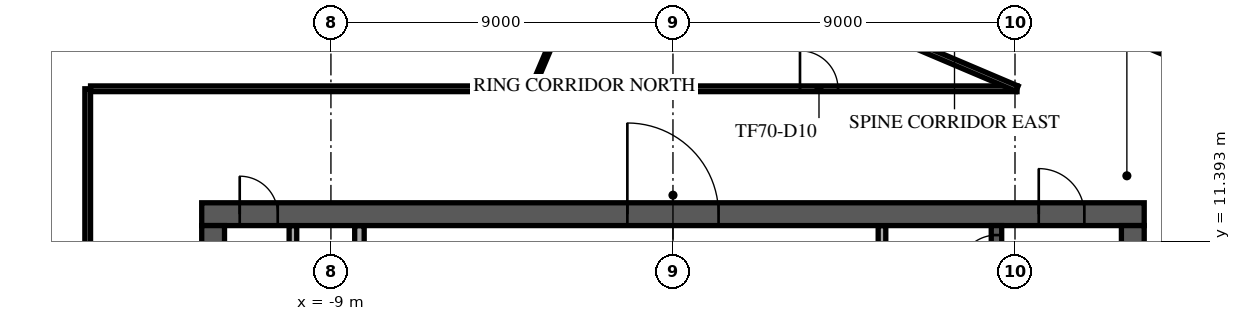
"""IFC4 building model, lengths in metres.
Left out: names, types, materials, properties, quantities, classifications, styles, units other than length and angle.
Written with IfcOpenShell. Run it as: python <this file> out.ifc"""

import sys

from ifc_helpers import new_model, si_unit, direction, frame, frame_2d, origin, place, context, subcontext, project, spatial, rectangle, extrude, element, fill, save


model = new_model("IFC4")
c1 = context("Model", 3, precision=1e-05, world=origin(), true_north=direction((0.0, 1.0)))
c2 = subcontext(c1, "Body", "Model", "MODEL_VIEW")
j1 = project(units=[si_unit("LENGTHUNIT", "METRE"), si_unit("PLANEANGLEUNIT", "RADIAN")], contexts=[c1])
p1 = place(None, origin())
s1 = spatial("IfcSite", under=j1, at=p1, CompositionType="ELEMENT")
p2 = place(p1, origin())
s2 = spatial("IfcBuilding", under=s1, at=p2, CompositionType="ELEMENT")
p3 = place(p2, frame((0.0, 0.0, 296.5)))
s3 = spatial("IfcBuildingStorey", under=s2, at=p3, CompositionType="ELEMENT", Elevation=296.5)
p4 = place(p3, frame((-12.4, 12.1, 0.0), z_axis=(0.0, 0.0, 1.0), x_axis=(1.0, 0.0, 0.0)))
e1 = element("IfcWall", 1, at=p4, inside=s3, PredefinedType="SHEAR", context=c2, shape_type="SweptSolid", body=[
    extrude(rectangle(XDim=24.8, YDim=0.6, at=frame_2d((12.4, 0.0))), origin(), (0.0, 0.0, 1.0), 3.65),
])
p5 = place(p4, frame((11.2, 0.0, 0.0)))
e2 = element("IfcOpeningElement", 2, at=p5, cuts=e1, PredefinedType="OPENING", context=c2, shape_type="SweptSolid", body=[
    extrude(rectangle(XDim=2.4, YDim=2.4, at=frame_2d((1.2, 1.2))), frame((0.0, 0.31, 0.0), z_axis=(0.0, -1.0, 0.0), x_axis=(1.0, 0.0, 0.0)), (0.0, 0.0, 1.0), 0.62),
])
p6 = place(p4, frame((22.025, 0.0, 0.0)))
e3 = element("IfcOpeningElement", 3, at=p6, cuts=e1, PredefinedType="OPENING", context=c2, shape_type="SweptSolid", body=[
    extrude(rectangle(XDim=1.2, YDim=2.1, at=frame_2d((0.6, 1.05))), frame((0.0, 0.31, 0.0), z_axis=(0.0, -1.0, 0.0), x_axis=(1.0, 0.0, 0.0)), (0.0, 0.0, 1.0), 0.62),
])
p7 = place(p4, frame((1.0, 0.0, 0.0)))
e4 = element("IfcOpeningElement", 4, at=p7, cuts=e1, PredefinedType="OPENING", context=c2, shape_type="SweptSolid", body=[
    extrude(rectangle(XDim=1.0, YDim=2.1, at=frame_2d((0.5, 1.05))), frame((0.0, 0.31, 0.0), z_axis=(0.0, -1.0, 0.0), x_axis=(1.0, 0.0, 0.0)), (0.0, 0.0, 1.0), 0.62),
])
p8 = place(p3, frame((12.1, -11.8, 0.0), z_axis=(0.0, 0.0, 1.0), x_axis=(0.0, 1.0, 0.0)))
e5 = element("IfcWall", 5, at=p8, inside=s3, PredefinedType="SHEAR", context=c2, shape_type="SweptSolid", body=[
    extrude(rectangle(XDim=23.6, YDim=0.6, at=frame_2d((11.8, 0.0))), origin(), (0.0, 0.0, 1.0), 3.65),
])
p9 = place(p8, frame((10.6, 0.0, 0.0)))
e6 = element("IfcOpeningElement", 6, at=p9, cuts=e5, PredefinedType="OPENING", context=c2, shape_type="SweptSolid", body=[
    extrude(rectangle(XDim=2.4, YDim=2.4, at=frame_2d((1.2, 1.2))), frame((0.0, 0.31, 0.0), z_axis=(0.0, -1.0, 0.0), x_axis=(1.0, 0.0, 0.0)), (0.0, 0.0, 1.0), 0.62),
])
p10 = place(p3, frame((-12.1, -11.8, 0.0), z_axis=(0.0, 0.0, 1.0), x_axis=(0.0, 1.0, 0.0)))
e7 = element("IfcWall", 7, at=p10, inside=s3, PredefinedType="SHEAR", context=c2, shape_type="SweptSolid", body=[
    extrude(rectangle(XDim=23.6, YDim=0.6, at=frame_2d((11.8, 0.0))), origin(), (0.0, 0.0, 1.0), 3.65),
])
p11 = place(p10, frame((10.6, 0.0, 0.0)))
e8 = element("IfcOpeningElement", 8, at=p11, cuts=e7, PredefinedType="OPENING", context=c2, shape_type="SweptSolid", body=[
    extrude(rectangle(XDim=2.4, YDim=2.4, at=frame_2d((1.2, 1.2))), frame((0.0, 0.31, 0.0), z_axis=(0.0, -1.0, 0.0), x_axis=(1.0, 0.0, 0.0)), (0.0, 0.0, 1.0), 0.62),
])
p12 = place(p3, frame((8.512, 4.55, 0.0), z_axis=(0.0, 0.0, 1.0), x_axis=(0.0, 1.0, 0.0)))
e9 = element("IfcWall", 9, at=p12, inside=s3, PredefinedType="SOLIDWALL", context=c2, shape_type="SweptSolid", body=[
    extrude(rectangle(XDim=7.25, YDim=0.275, at=frame_2d((3.625, 0.0))), origin(), (0.0, 0.0, 1.0), 3.65),
])
p13 = place(p12, frame((6.0, 0.0, 0.0)))
e10 = element("IfcOpeningElement", 10, at=p13, cuts=e9, PredefinedType="OPENING", context=c2, shape_type="SweptSolid", body=[
    extrude(rectangle(XDim=1.0, YDim=2.1, at=frame_2d((0.5, 1.05))), frame((0.0, 0.147, 0.0), z_axis=(0.0, -1.0, 0.0), x_axis=(1.0, 0.0, 0.0)), (0.0, 0.0, 1.0), 0.295),
])
p14 = place(p3, frame((-10.0, 4.78, 0.0), z_axis=(0.0, 0.0, 1.0), x_axis=(0.0, 1.0, 0.0)))
e11 = element("IfcWall", 11, at=p14, inside=s3, PredefinedType="PARTITIONING", context=c2, shape_type="SweptSolid", body=[
    extrude(rectangle(XDim=7.015, YDim=0.2, at=frame_2d((3.507, 0.0))), origin(), (0.0, 0.0, 1.0), 3.65),
])
p15 = place(p14, frame((2.92, 0.0, 0.0)))
e12 = element("IfcOpeningElement", 12, at=p15, cuts=e11, PredefinedType="OPENING", context=c2, shape_type="SweptSolid", body=[
    extrude(rectangle(XDim=1.0, YDim=2.1, at=frame_2d((0.5, 1.05))), frame((0.0, 0.11, 0.0), z_axis=(0.0, -1.0, 0.0), x_axis=(1.0, 0.0, 0.0)), (0.0, 0.0, 1.0), 0.22),
])
p16 = place(p3, frame((-8.25, 8.805, 0.0), z_axis=(0.0, 0.0, 1.0), x_axis=(0.0, 1.0, 0.0)))
e13 = element("IfcWall", 13, at=p16, inside=s3, PredefinedType="PARTITIONING", context=c2, shape_type="SweptSolid", body=[
    extrude(rectangle(XDim=2.99, YDim=0.25, at=frame_2d((1.495, 0.0))), origin(), (0.0, 0.0, 1.0), 3.65),
])
p17 = place(p16, frame((0.895, 0.0, 0.0)))
e14 = element("IfcOpeningElement", 14, at=p17, cuts=e13, PredefinedType="OPENING", context=c2, shape_type="SweptSolid", body=[
    extrude(rectangle(XDim=1.0, YDim=2.1, at=frame_2d((0.5, 1.05))), frame((0.0, 0.135, 0.0), z_axis=(0.0, -1.0, 0.0), x_axis=(1.0, 0.0, 0.0)), (0.0, 0.0, 1.0), 0.27),
])
p18 = place(p3, frame((5.5, 8.805, 0.0), z_axis=(0.0, 0.0, 1.0), x_axis=(0.0, 1.0, 0.0)))
e15 = element("IfcWall", 15, at=p18, inside=s3, PredefinedType="PARTITIONING", context=c2, shape_type="SweptSolid", body=[
    extrude(rectangle(XDim=2.99, YDim=0.2, at=frame_2d((1.495, 0.0))), origin(), (0.0, 0.0, 1.0), 3.65),
])
p19 = place(p18, frame((0.532, 0.0, 0.0)))
e16 = element("IfcOpeningElement", 16, at=p19, cuts=e15, PredefinedType="OPENING", context=c2, shape_type="SweptSolid", body=[
    extrude(rectangle(XDim=1.8, YDim=2.1, at=frame_2d((0.9, 1.05))), frame((0.0, 0.11, 0.0), z_axis=(0.0, -1.0, 0.0), x_axis=(1.0, 0.0, 0.0)), (0.0, 0.0, 1.0), 0.22),
])
p20 = place(p3, frame((-15.005, 32.985, 0.0), z_axis=(0.0, 0.0, 1.0), x_axis=(-0.39073034436, -0.920505186295, 0.0)))
e17 = element("IfcWall", 17, at=p20, inside=s3, PredefinedType="STANDARD", context=c2, shape_type="SweptSolid", body=[
    extrude(rectangle(XDim=48.49, YDim=0.6, at=frame_2d((24.245, 0.0))), origin(), (0.0, 0.0, 1.0), 3.65),
])
p21 = place(p20, frame((1.204, 0.0, 0.9)))
e18 = element("IfcOpeningElement", 18, at=p21, cuts=e17, PredefinedType="OPENING", context=c2, shape_type="SweptSolid", body=[
    extrude(rectangle(XDim=2.0, YDim=2.1, at=frame_2d((1.0, 1.05))), frame((0.0, 0.31, 0.0), z_axis=(0.0, -1.0, 0.0), x_axis=(1.0, 0.0, 0.0)), (0.0, 0.0, 1.0), 0.62),
])
p22 = place(p20, frame((5.612, 0.0, 0.9)))
e19 = element("IfcOpeningElement", 19, at=p22, cuts=e17, PredefinedType="OPENING", context=c2, shape_type="SweptSolid", body=[
    extrude(rectangle(XDim=2.0, YDim=2.1, at=frame_2d((1.0, 1.05))), frame((0.0, 0.31, 0.0), z_axis=(0.0, -1.0, 0.0), x_axis=(1.0, 0.0, 0.0)), (0.0, 0.0, 1.0), 0.62),
])
p23 = place(p20, frame((10.021, 0.0, 0.9)))
e20 = element("IfcOpeningElement", 20, at=p23, cuts=e17, PredefinedType="OPENING", context=c2, shape_type="SweptSolid", body=[
    extrude(rectangle(XDim=2.0, YDim=2.1, at=frame_2d((1.0, 1.05))), frame((0.0, 0.31, 0.0), z_axis=(0.0, -1.0, 0.0), x_axis=(1.0, 0.0, 0.0)), (0.0, 0.0, 1.0), 0.62),
])
p24 = place(p20, frame((14.428, 0.0, 0.9)))
e21 = element("IfcOpeningElement", 21, at=p24, cuts=e17, PredefinedType="OPENING", context=c2, shape_type="SweptSolid", body=[
    extrude(rectangle(XDim=2.0, YDim=2.1, at=frame_2d((1.0, 1.05))), frame((0.0, 0.31, 0.0), z_axis=(0.0, -1.0, 0.0), x_axis=(1.0, 0.0, 0.0)), (0.0, 0.0, 1.0), 0.62),
])
p25 = place(p20, frame((18.837, 0.0, 0.9)))
e22 = element("IfcOpeningElement", 22, at=p25, cuts=e17, PredefinedType="OPENING", context=c2, shape_type="SweptSolid", body=[
    extrude(rectangle(XDim=2.0, YDim=2.1, at=frame_2d((1.0, 1.05))), frame((0.0, 0.31, 0.0), z_axis=(0.0, -1.0, 0.0), x_axis=(1.0, 0.0, 0.0)), (0.0, 0.0, 1.0), 0.62),
])
p26 = place(p20, frame((23.245, 0.0, 0.9)))
e23 = element("IfcOpeningElement", 23, at=p26, cuts=e17, PredefinedType="OPENING", context=c2, shape_type="SweptSolid", body=[
    extrude(rectangle(XDim=2.0, YDim=2.1, at=frame_2d((1.0, 1.05))), frame((0.0, 0.31, 0.0), z_axis=(0.0, -1.0, 0.0), x_axis=(1.0, 0.0, 0.0)), (0.0, 0.0, 1.0), 0.62),
])
p27 = place(p20, frame((27.653, 0.0, 0.9)))
e24 = element("IfcOpeningElement", 24, at=p27, cuts=e17, PredefinedType="OPENING", context=c2, shape_type="SweptSolid", body=[
    extrude(rectangle(XDim=2.0, YDim=2.1, at=frame_2d((1.0, 1.05))), frame((0.0, 0.31, 0.0), z_axis=(0.0, -1.0, 0.0), x_axis=(1.0, 0.0, 0.0)), (0.0, 0.0, 1.0), 0.62),
])
p28 = place(p20, frame((32.061, 0.0, 0.9)))
e25 = element("IfcOpeningElement", 25, at=p28, cuts=e17, PredefinedType="OPENING", context=c2, shape_type="SweptSolid", body=[
    extrude(rectangle(XDim=2.0, YDim=2.1, at=frame_2d((1.0, 1.05))), frame((0.0, 0.31, 0.0), z_axis=(0.0, -1.0, 0.0), x_axis=(1.0, 0.0, 0.0)), (0.0, 0.0, 1.0), 0.62),
])
p29 = place(p20, frame((36.469, 0.0, 0.9)))
e26 = element("IfcOpeningElement", 26, at=p29, cuts=e17, PredefinedType="OPENING", context=c2, shape_type="SweptSolid", body=[
    extrude(rectangle(XDim=2.0, YDim=2.1, at=frame_2d((1.0, 1.05))), frame((0.0, 0.31, 0.0), z_axis=(0.0, -1.0, 0.0), x_axis=(1.0, 0.0, 0.0)), (0.0, 0.0, 1.0), 0.62),
])
p30 = place(p20, frame((40.877, 0.0, 0.9)))
e27 = element("IfcOpeningElement", 27, at=p30, cuts=e17, PredefinedType="OPENING", context=c2, shape_type="SweptSolid", body=[
    extrude(rectangle(XDim=2.0, YDim=2.1, at=frame_2d((1.0, 1.05))), frame((0.0, 0.31, 0.0), z_axis=(0.0, -1.0, 0.0), x_axis=(1.0, 0.0, 0.0)), (0.0, 0.0, 1.0), 0.62),
])
p31 = place(p20, frame((45.285, 0.0, 0.9)))
e28 = element("IfcOpeningElement", 28, at=p31, cuts=e17, PredefinedType="OPENING", context=c2, shape_type="SweptSolid", body=[
    extrude(rectangle(XDim=2.0, YDim=2.1, at=frame_2d((1.0, 1.05))), frame((0.0, 0.31, 0.0), z_axis=(0.0, -1.0, 0.0), x_axis=(1.0, 0.0, 0.0)), (0.0, 0.0, 1.0), 0.62),
])
p32 = place(p3, frame((-15.4, -12.4, 0.0), z_axis=(0.0, 0.0, 1.0), x_axis=(0.0, 1.0, 0.0)))
e29 = element("IfcWall", 29, at=p32, inside=s3, PredefinedType="PARTITIONING", context=c2, shape_type="SweptSolid", body=[
    extrude(rectangle(XDim=27.8, YDim=0.15, at=frame_2d((13.9, 0.0))), origin(), (0.0, 0.0, 1.0), 3.25),
])
p33 = place(p32, frame((7.608, 0.0, 0.0)))
e30 = element("IfcOpeningElement", 30, at=p33, cuts=e29, PredefinedType="OPENING", context=c2, shape_type="SweptSolid", body=[
    extrude(rectangle(XDim=1.0, YDim=2.1, at=frame_2d((0.5, 1.05))), frame((0.0, 0.085, 0.0), z_axis=(0.0, -1.0, 0.0), x_axis=(1.0, 0.0, 0.0)), (0.0, 0.0, 1.0), 0.17),
])
p34 = place(p32, frame((16.435, 0.0, 0.0)))
e31 = element("IfcOpeningElement", 31, at=p34, cuts=e29, PredefinedType="OPENING", context=c2, shape_type="SweptSolid", body=[
    extrude(rectangle(XDim=1.0, YDim=2.1, at=frame_2d((0.5, 1.05))), frame((0.0, 0.085, 0.0), z_axis=(0.0, -1.0, 0.0), x_axis=(1.0, 0.0, 0.0)), (0.0, 0.0, 1.0), 0.17),
])
p35 = place(p3, frame((-15.325, 15.4, 0.0), z_axis=(0.0, 0.0, 1.0), x_axis=(1.0, 0.0, 0.0)))
e32 = element("IfcWall", 32, at=p35, inside=s3, PredefinedType="PARTITIONING", context=c2, shape_type="SweptSolid", body=[
    extrude(rectangle(XDim=24.378, YDim=0.15, at=frame_2d((12.189, 0.0))), origin(), (0.0, 0.0, 1.0), 3.25),
])
p36 = place(p35, frame((18.667, 0.0, 0.0)))
e33 = element("IfcOpeningElement", 33, at=p36, cuts=e32, PredefinedType="OPENING", context=c2, shape_type="SweptSolid", body=[
    extrude(rectangle(XDim=1.0, YDim=2.1, at=frame_2d((0.5, 1.05))), frame((0.0, 0.085, 0.0), z_axis=(0.0, -1.0, 0.0), x_axis=(1.0, 0.0, 0.0)), (0.0, 0.0, 1.0), 0.17),
])
p37 = place(p3, frame((-9.114, 23.116, 0.0), z_axis=(0.0, 0.0, 1.0), x_axis=(0.920508047483, -0.390723603739, 0.0)))
e34 = element("IfcWall", 34, at=p37, inside=s3, PredefinedType="PARTITIONING", context=c2, shape_type="SweptSolid", body=[
    extrude(rectangle(XDim=19.737, YDim=0.15, at=frame_2d((9.868, 0.0))), origin(), (0.0, 0.0, 1.0), 3.25),
])
p38 = place(p3, frame((-8.176, 25.325, 0.0), z_axis=(0.0, 0.0, 1.0), x_axis=(0.920507643781, -0.390724554821, 0.0)))
e35 = element("IfcWall", 35, at=p38, inside=s3, PredefinedType="PARTITIONING", context=c2, shape_type="SweptSolid", body=[
    extrude(rectangle(XDim=34.917, YDim=0.15, at=frame_2d((17.458, 0.0))), origin(), (0.0, 0.0, 1.0), 3.25),
])
p39 = place(p38, frame((5.55, 0.0, 0.0)))
e36 = element("IfcOpeningElement", 36, at=p39, cuts=e35, PredefinedType="OPENING", context=c2, shape_type="SweptSolid", body=[
    extrude(rectangle(XDim=1.8, YDim=2.1, at=frame_2d((0.9, 1.05))), frame((0.0, 0.085, 0.0), z_axis=(0.0, -1.0, 0.0), x_axis=(1.0, 0.0, 0.0)), (0.0, 0.0, 1.0), 0.17),
])
p40 = place(p38, frame((1.05, 0.0, 0.0)))
e37 = element("IfcOpeningElement", 37, at=p40, cuts=e35, PredefinedType="OPENING", context=c2, shape_type="SweptSolid", body=[
    extrude(rectangle(XDim=1.0, YDim=2.1, at=frame_2d((0.5, 1.05))), frame((0.0, 0.085, 0.0), z_axis=(0.0, -1.0, 0.0), x_axis=(1.0, 0.0, 0.0)), (0.0, 0.0, 1.0), 0.17),
])
p41 = place(p38, frame((16.098, 0.0, 0.0)))
e38 = element("IfcOpeningElement", 38, at=p41, cuts=e35, PredefinedType="OPENING", context=c2, shape_type="SweptSolid", body=[
    extrude(rectangle(XDim=1.0, YDim=2.1, at=frame_2d((0.5, 1.05))), frame((0.0, 0.085, 0.0), z_axis=(0.0, -1.0, 0.0), x_axis=(1.0, 0.0, 0.0)), (0.0, 0.0, 1.0), 0.17),
])
p42 = place(p38, frame((23.547, 0.0, 0.0)))
e39 = element("IfcOpeningElement", 39, at=p42, cuts=e35, PredefinedType="OPENING", context=c2, shape_type="SweptSolid", body=[
    extrude(rectangle(XDim=1.0, YDim=2.1, at=frame_2d((0.5, 1.05))), frame((0.0, 0.085, 0.0), z_axis=(0.0, -1.0, 0.0), x_axis=(1.0, 0.0, 0.0)), (0.0, 0.0, 1.0), 0.17),
])
p43 = place(p3, frame((-3.667, 15.494, 0.0), z_axis=(0.0, 0.0, 1.0), x_axis=(0.390616296151, 0.920553588435, 0.0)))
e40 = element("IfcWall", 40, at=p43, inside=s3, PredefinedType="PARTITIONING", context=c2, shape_type="SweptSolid", body=[
    extrude(rectangle(XDim=4.812, YDim=0.1, at=frame_2d((2.406, 0.0))), origin(), (0.0, 0.0, 1.0), 3.25),
])
p44 = place(p5, origin())
e41 = element("IfcDoor", 41, at=p44, inside=s3, OperationType="SINGLE_SWING_LEFT", PredefinedType="DOOR", context=c2, shape_type="SweptSolid", body=[
    extrude(rectangle(XDim=2.4, YDim=2.4, at=frame_2d((1.2, 1.2))), frame((0.0, 0.025, 0.0), z_axis=(0.0, -1.0, 0.0), x_axis=(1.0, 0.0, 0.0)), (0.0, 0.0, 1.0), 0.05),
])
fill(e2, e41)
p45 = place(p6, origin())
e42 = element("IfcDoor", 42, at=p45, inside=s3, OperationType="SINGLE_SWING_LEFT", PredefinedType="DOOR", context=c2, shape_type="SweptSolid", body=[
    extrude(rectangle(XDim=1.2, YDim=2.1, at=frame_2d((0.6, 1.05))), frame((0.0, 0.025, 0.0), z_axis=(0.0, -1.0, 0.0), x_axis=(1.0, 0.0, 0.0)), (0.0, 0.0, 1.0), 0.05),
])
fill(e3, e42)
p46 = place(p7, origin())
e43 = element("IfcDoor", 43, at=p46, inside=s3, OperationType="SINGLE_SWING_LEFT", PredefinedType="DOOR", context=c2, shape_type="SweptSolid", body=[
    extrude(rectangle(XDim=1.0, YDim=2.1, at=frame_2d((0.5, 1.05))), frame((0.0, 0.025, 0.0), z_axis=(0.0, -1.0, 0.0), x_axis=(1.0, 0.0, 0.0)), (0.0, 0.0, 1.0), 0.05),
])
fill(e4, e43)
p47 = place(p13, origin())
e44 = element("IfcDoor", 44, at=p47, inside=s3, OperationType="SINGLE_SWING_LEFT", PredefinedType="DOOR", context=c2, shape_type="SweptSolid", body=[
    extrude(rectangle(XDim=1.0, YDim=2.1, at=frame_2d((0.5, 1.05))), frame((0.0, 0.025, 0.0), z_axis=(0.0, -1.0, 0.0), x_axis=(1.0, 0.0, 0.0)), (0.0, 0.0, 1.0), 0.05),
])
fill(e10, e44)
p48 = place(p36, origin())
e45 = element("IfcDoor", 45, at=p48, inside=s3, OperationType="SINGLE_SWING_RIGHT", PredefinedType="DOOR", context=c2, shape_type="SweptSolid", body=[
    extrude(rectangle(XDim=1.0, YDim=2.1, at=frame_2d((0.5, 1.05))), frame((0.0, 0.025, 0.0), z_axis=(0.0, -1.0, 0.0), x_axis=(1.0, 0.0, 0.0)), (0.0, 0.0, 1.0), 0.05),
])
fill(e33, e45)
save(model, sys.argv[1])
